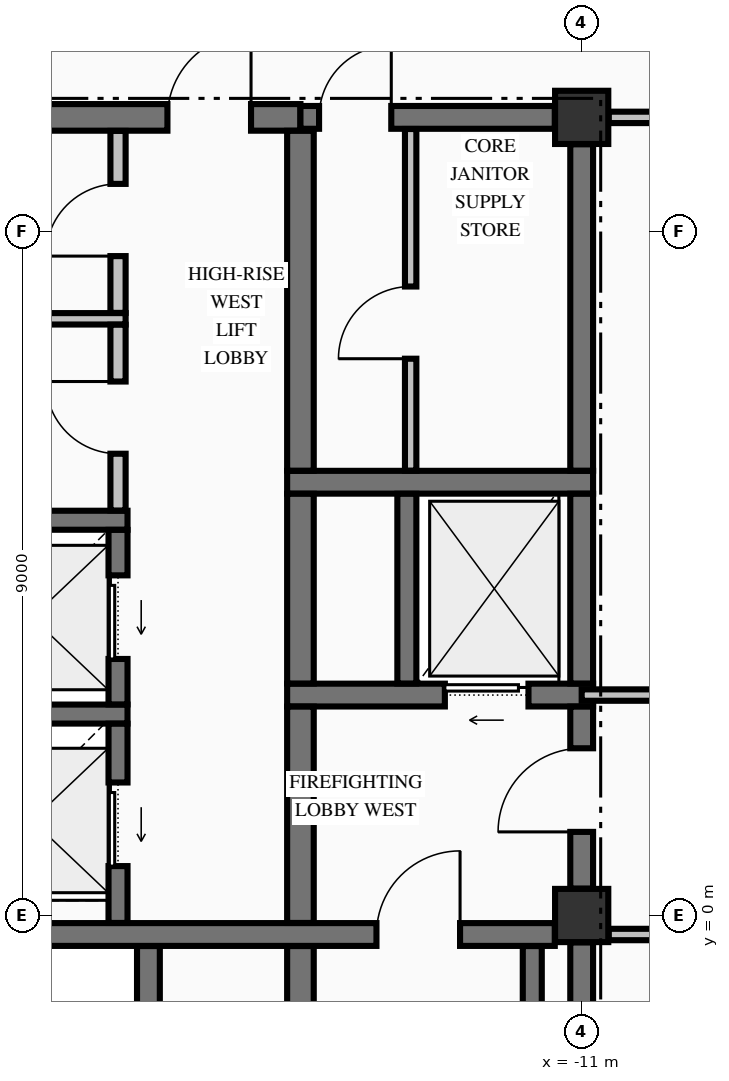
"""IFC4 building model, lengths in metres.
Left out: names, types, materials, properties, quantities, classifications, styles, units other than length and angle.
Written with IfcOpenShell. Run it as: python <this file> out.ifc"""

import sys

from ifc_helpers import new_model, si_unit, direction, frame, frame_2d, origin, origin_2d, place, context, subcontext, project, spatial, rectangle, extrude, element, fill, save


model = new_model("IFC4")
c1 = context("Model", 3, precision=1e-05, world=origin(), true_north=direction((0.0, 1.0)))
c2 = subcontext(c1, "Body", "Model", "MODEL_VIEW")
j1 = project(units=[si_unit("LENGTHUNIT", "METRE"), si_unit("PLANEANGLEUNIT", "RADIAN")], contexts=[c1])
p1 = place(None, origin())
s1 = spatial("IfcSite", under=j1, at=p1, CompositionType="ELEMENT")
p2 = place(p1, origin())
s2 = spatial("IfcBuilding", under=s1, at=p2, CompositionType="ELEMENT")
p3 = place(p2, frame((0.0, 0.0, 254.43)))
s3 = spatial("IfcBuildingStorey", under=s2, at=p3, CompositionType="ELEMENT", Elevation=254.43)
for number, where, z_axis, x_axis in (
    (1, (-11.0, 0.0, -0.425), (0.0, 0.0, 1.0), (1.0, 0.0, 0.0)),
    (2, (-11.0, 10.5, -0.425), (0.0, 0.0, 1.0), (1.0, 0.0, 0.0)),
):
    element("IfcColumn", number, at=place(p3, frame(where, z_axis=z_axis, x_axis=x_axis)), inside=s3, PredefinedType="COLUMN", context=c2, shape_type="SweptSolid", body=[
        extrude(rectangle(XDim=0.7, YDim=0.7, at=origin_2d()), origin(), (0.0, 0.0, 1.0), 3.405),
    ])
p4 = place(p3, frame((-19.646, -0.25, 0.0), z_axis=(0.0, 0.0, 1.0), x_axis=(1.0, 0.0, 0.0)))
e3 = element("IfcWall", 3, at=p4, inside=s3, PredefinedType="SHEAR", context=c2, shape_type="SweptSolid", body=[
    extrude(rectangle(XDim=8.292, YDim=0.3, at=frame_2d((4.146, 0.0))), origin(), (0.0, 0.0, 1.0), 2.98),
])
p5 = place(p4, frame((5.946, 0.0, 0.0)))
e4 = element("IfcOpeningElement", 4, at=p5, cuts=e3, PredefinedType="OPENING", context=c2, shape_type="SweptSolid", body=[
    extrude(rectangle(XDim=1.1, YDim=2.15, at=frame_2d((0.55, 1.075))), frame((0.0, 0.16, 0.0), z_axis=(0.0, -1.0, 0.0), x_axis=(1.0, 0.0, 0.0)), (0.0, 0.0, 1.0), 0.32),
])
p6 = place(p3, frame((-20.175, 2.65, 0.0), z_axis=(0.0, 0.0, 1.0), x_axis=(1.0, 0.0, 0.0)))
e5 = element("IfcWall", 5, at=p6, inside=s3, PredefinedType="SOLIDWALL", context=c2, shape_type="SweptSolid", body=[
    extrude(rectangle(XDim=3.2, YDim=0.25, at=frame_2d((1.6, 0.0))), origin(), (0.0, 0.0, 1.0), 2.98),
])
p7 = place(p3, frame((-14.875, 2.9, 0.0), z_axis=(0.0, 0.0, 1.0), x_axis=(1.0, 0.0, 0.0)))
e6 = element("IfcWall", 6, at=p7, inside=s3, PredefinedType="SHEAR", context=c2, shape_type="SweptSolid", body=[
    extrude(rectangle(XDim=4.025, YDim=0.3, at=frame_2d((2.012, 0.0))), origin(), (0.0, 0.0, 1.0), 2.98),
])
p8 = place(p7, frame((2.075, 0.0, 0.0)))
e7 = element("IfcOpeningElement", 7, at=p8, cuts=e6, PredefinedType="OPENING", context=c2, shape_type="SweptSolid", body=[
    extrude(rectangle(XDim=1.1, YDim=2.2, at=frame_2d((0.55, 1.1))), frame((0.0, 0.16, 0.0), z_axis=(0.0, -1.0, 0.0), x_axis=(1.0, 0.0, 0.0)), (0.0, 0.0, 1.0), 0.32),
])
p9 = place(p3, frame((-20.175, 5.2, 0.0), z_axis=(0.0, 0.0, 1.0), x_axis=(1.0, 0.0, 0.0)))
e8 = element("IfcWall", 8, at=p9, inside=s3, PredefinedType="SOLIDWALL", context=c2, shape_type="SweptSolid", body=[
    extrude(rectangle(XDim=3.2, YDim=0.25, at=frame_2d((1.6, 0.0))), origin(), (0.0, 0.0, 1.0), 2.98),
])
p10 = place(p3, frame((-14.875, 5.7, 0.0), z_axis=(0.0, 0.0, 1.0), x_axis=(1.0, 0.0, 0.0)))
e9 = element("IfcWall", 9, at=p10, inside=s3, PredefinedType="SHEAR", context=c2, shape_type="SweptSolid", body=[
    extrude(rectangle(XDim=4.025, YDim=0.3, at=frame_2d((2.012, 0.0))), origin(), (0.0, 0.0, 1.0), 2.98),
])
p11 = place(p3, frame((-19.646, 10.5, 0.0), z_axis=(0.0, 0.0, 1.0), x_axis=(1.0, 0.0, 0.0)))
e10 = element("IfcWall", 10, at=p11, inside=s3, PredefinedType="SHEAR", context=c2, shape_type="SweptSolid", body=[
    extrude(rectangle(XDim=4.946, YDim=0.35, at=frame_2d((2.473, 0.0))), origin(), (0.0, 0.0, 1.0), 2.98),
])
p12 = place(p11, frame((3.196, 0.0, 0.0)))
e11 = element("IfcOpeningElement", 11, at=p12, cuts=e10, PredefinedType="OPENING", context=c2, shape_type="SweptSolid", body=[
    extrude(rectangle(XDim=1.1, YDim=2.15, at=frame_2d((0.55, 1.075))), frame((0.0, 0.185, 0.0), z_axis=(0.0, -1.0, 0.0), x_axis=(1.0, 0.0, 0.0)), (0.0, 0.0, 1.0), 0.37),
])
p13 = place(p3, frame((-14.7, 10.5, 0.0), z_axis=(0.0, 0.0, 1.0), x_axis=(1.0, 0.0, 0.0)))
e12 = element("IfcWall", 12, at=p13, inside=s3, PredefinedType="SHEAR", context=c2, shape_type="SweptSolid", body=[
    extrude(rectangle(XDim=3.346, YDim=0.3, at=frame_2d((1.673, 0.0))), origin(), (0.0, 0.0, 1.0), 2.98),
])
p14 = place(p13, frame((0.245, 0.0, 0.0)))
e13 = element("IfcOpeningElement", 13, at=p14, cuts=e12, PredefinedType="OPENING", context=c2, shape_type="SweptSolid", body=[
    extrude(rectangle(XDim=0.95, YDim=2.15, at=frame_2d((0.475, 1.075))), frame((0.0, 0.16, 0.0), z_axis=(0.0, -1.0, 0.0), x_axis=(1.0, 0.0, 0.0)), (0.0, 0.0, 1.0), 0.32),
])
p15 = place(p3, frame((-10.644, -0.25, 0.0), z_axis=(0.0, 0.0, 1.0), x_axis=(1.0, 0.0, 0.0)))
e14 = element("IfcWall", 14, at=p15, inside=s3, PredefinedType="PARTITIONING", context=c2, shape_type="SweptSolid", body=[
    extrude(rectangle(XDim=21.288, YDim=0.15, at=frame_2d((10.644, 0.0))), origin(), (0.0, 0.0, 1.0), 2.98),
])
p16 = place(p15, frame((7.344, 0.0, 0.0)))
e15 = element("IfcOpeningElement", 15, at=p16, cuts=e14, PredefinedType="OPENING", context=c2, shape_type="SweptSolid", body=[
    extrude(rectangle(XDim=1.1, YDim=2.15, at=frame_2d((0.55, 1.075))), frame((0.0, 0.085, 0.0), z_axis=(0.0, -1.0, 0.0), x_axis=(1.0, 0.0, 0.0)), (0.0, 0.0, 1.0), 0.17),
])
p17 = place(p15, frame((2.699, 0.0, 0.0)))
e16 = element("IfcOpeningElement", 16, at=p17, cuts=e14, PredefinedType="OPENING", context=c2, shape_type="SweptSolid", body=[
    extrude(rectangle(XDim=1.05, YDim=2.15, at=frame_2d((0.525, 1.075))), frame((0.0, 0.085, 0.0), z_axis=(0.0, -1.0, 0.0), x_axis=(1.0, 0.0, 0.0)), (0.0, 0.0, 1.0), 0.17),
])
p18 = place(p15, frame((14.839, 0.0, 0.0)))
e17 = element("IfcOpeningElement", 17, at=p18, cuts=e14, PredefinedType="OPENING", context=c2, shape_type="SweptSolid", body=[
    extrude(rectangle(XDim=0.95, YDim=2.15, at=frame_2d((0.475, 1.075))), frame((0.0, 0.085, 0.0), z_axis=(0.0, -1.0, 0.0), x_axis=(1.0, 0.0, 0.0)), (0.0, 0.0, 1.0), 0.17),
])
p19 = place(p3, frame((-11.0, 2.9, 0.0), z_axis=(0.0, 0.0, 1.0), x_axis=(1.0, 0.0, 0.0)))
e18 = element("IfcWall", 18, at=p19, inside=s3, PredefinedType="PARTITIONING", context=c2, shape_type="SweptSolid", body=[
    extrude(rectangle(XDim=22.0, YDim=0.15, at=frame_2d((11.0, 0.0))), origin(), (0.0, 0.0, 1.0), 2.98),
])
p20 = place(p19, frame((7.7, 0.0, 0.0)))
e19 = element("IfcOpeningElement", 19, at=p20, cuts=e18, PredefinedType="OPENING", context=c2, shape_type="SweptSolid", body=[
    extrude(rectangle(XDim=1.1, YDim=2.15, at=frame_2d((0.55, 1.075))), frame((0.0, 0.085, 0.0), z_axis=(0.0, -1.0, 0.0), x_axis=(1.0, 0.0, 0.0)), (0.0, 0.0, 1.0), 0.17),
])
p21 = place(p19, frame((3.055, 0.0, 0.0)))
e20 = element("IfcOpeningElement", 20, at=p21, cuts=e18, PredefinedType="OPENING", context=c2, shape_type="SweptSolid", body=[
    extrude(rectangle(XDim=1.05, YDim=2.15, at=frame_2d((0.525, 1.075))), frame((0.0, 0.085, 0.0), z_axis=(0.0, -1.0, 0.0), x_axis=(1.0, 0.0, 0.0)), (0.0, 0.0, 1.0), 0.17),
])
p22 = place(p19, frame((11.475, 0.0, 0.0)))
e21 = element("IfcOpeningElement", 21, at=p22, cuts=e18, PredefinedType="OPENING", context=c2, shape_type="SweptSolid", body=[
    extrude(rectangle(XDim=0.95, YDim=2.15, at=frame_2d((0.475, 1.075))), frame((0.0, 0.085, 0.0), z_axis=(0.0, -1.0, 0.0), x_axis=(1.0, 0.0, 0.0)), (0.0, 0.0, 1.0), 0.17),
])
p23 = place(p19, frame((17.795, 0.0, 0.0)))
e22 = element("IfcOpeningElement", 22, at=p23, cuts=e18, PredefinedType="OPENING", context=c2, shape_type="SweptSolid", body=[
    extrude(rectangle(XDim=0.95, YDim=2.15, at=frame_2d((0.475, 1.075))), frame((0.0, 0.085, 0.0), z_axis=(0.0, -1.0, 0.0), x_axis=(1.0, 0.0, 0.0)), (0.0, 0.0, 1.0), 0.17),
])
p24 = place(p3, frame((-19.822, 7.85, 0.0), z_axis=(0.0, 0.0, 1.0), x_axis=(1.0, 0.0, 0.0)))
e23 = element("IfcWall", 23, at=p24, inside=s3, PredefinedType="PARTITIONING", context=c2, shape_type="SweptSolid", body=[
    extrude(rectangle(XDim=2.822, YDim=0.15, at=frame_2d((1.411, 0.0))), origin(), (0.0, 0.0, 1.0), 2.98),
])
p25 = place(p3, frame((-10.644, 10.5, 0.0), z_axis=(0.0, 0.0, 1.0), x_axis=(1.0, 0.0, 0.0)))
e24 = element("IfcWall", 24, at=p25, inside=s3, PredefinedType="PARTITIONING", context=c2, shape_type="SweptSolid", body=[
    extrude(rectangle(XDim=21.288, YDim=0.15, at=frame_2d((10.644, 0.0))), origin(), (0.0, 0.0, 1.0), 2.98),
])
p26 = place(p25, frame((7.344, 0.0, 0.0)))
e25 = element("IfcOpeningElement", 25, at=p26, cuts=e24, PredefinedType="OPENING", context=c2, shape_type="SweptSolid", body=[
    extrude(rectangle(XDim=1.1, YDim=2.15, at=frame_2d((0.55, 1.075))), frame((0.0, 0.085, 0.0), z_axis=(0.0, -1.0, 0.0), x_axis=(1.0, 0.0, 0.0)), (0.0, 0.0, 1.0), 0.17),
])
p27 = place(p3, frame((-17.1, -0.098, 0.0), z_axis=(0.0, 0.0, 1.0), x_axis=(0.0, 1.0, 0.0)))
e26 = element("IfcWall", 26, at=p27, inside=s3, PredefinedType="SOLIDWALL", context=c2, shape_type="SweptSolid", body=[
    extrude(rectangle(XDim=2.621, YDim=0.25, at=frame_2d((1.311, 0.0))), origin(), (0.0, 0.0, 1.0), 2.98),
])
p28 = place(p27, frame((0.748, 0.0, 0.0)))
e27 = element("IfcOpeningElement", 27, at=p28, cuts=e26, PredefinedType="OPENING", context=c2, shape_type="SweptSolid", body=[
    extrude(rectangle(XDim=1.1, YDim=2.2, at=frame_2d((0.55, 1.1))), frame((0.0, 0.135, 0.0), z_axis=(0.0, -1.0, 0.0), x_axis=(1.0, 0.0, 0.0)), (0.0, 0.0, 1.0), 0.27),
])
p29 = place(p3, frame((-17.1, 2.777, 0.0), z_axis=(0.0, 0.0, 1.0), x_axis=(0.0, 1.0, 0.0)))
e28 = element("IfcWall", 28, at=p29, inside=s3, PredefinedType="SOLIDWALL", context=c2, shape_type="SweptSolid", body=[
    extrude(rectangle(XDim=2.296, YDim=0.25, at=frame_2d((1.148, 0.0))), origin(), (0.0, 0.0, 1.0), 2.98),
])
p30 = place(p29, frame((0.598, 0.0, 0.0)))
e29 = element("IfcOpeningElement", 29, at=p30, cuts=e28, PredefinedType="OPENING", context=c2, shape_type="SweptSolid", body=[
    extrude(rectangle(XDim=1.1, YDim=2.2, at=frame_2d((0.55, 1.1))), frame((0.0, 0.135, 0.0), z_axis=(0.0, -1.0, 0.0), x_axis=(1.0, 0.0, 0.0)), (0.0, 0.0, 1.0), 0.27),
])
p31 = place(p3, frame((-16.7, -9.773, 0.0), z_axis=(0.0, 0.0, 1.0), x_axis=(0.0, 1.0, 0.0)))
e30 = element("IfcWall", 30, at=p31, inside=s3, PredefinedType="SHEAR", context=c2, shape_type="SweptSolid", body=[
    extrude(rectangle(XDim=9.371, YDim=0.3, at=frame_2d((4.686, 0.0))), origin(), (0.0, 0.0, 1.0), 2.98),
])
p32 = place(p3, frame((-14.7, -9.773, 0.0), z_axis=(0.0, 0.0, 1.0), x_axis=(0.0, 1.0, 0.0)))
e31 = element("IfcWall", 31, at=p32, inside=s3, PredefinedType="SHEAR", context=c2, shape_type="SweptSolid", body=[
    extrude(rectangle(XDim=9.371, YDim=0.35, at=frame_2d((4.686, 0.0))), origin(), (0.0, 0.0, 1.0), 2.98),
])
p33 = place(p3, frame((-14.7, -0.098, 0.0), z_axis=(0.0, 0.0, 1.0), x_axis=(0.0, 1.0, 0.0)))
e32 = element("IfcWall", 32, at=p33, inside=s3, PredefinedType="SHEAR", context=c2, shape_type="SweptSolid", body=[
    extrude(rectangle(XDim=2.846, YDim=0.35, at=frame_2d((1.423, 0.0))), origin(), (0.0, 0.0, 1.0), 2.98),
])
p34 = place(p3, frame((-14.7, 3.052, 0.0), z_axis=(0.0, 0.0, 1.0), x_axis=(0.0, 1.0, 0.0)))
e33 = element("IfcWall", 33, at=p34, inside=s3, PredefinedType="SHEAR", context=c2, shape_type="SweptSolid", body=[
    extrude(rectangle(XDim=2.496, YDim=0.35, at=frame_2d((1.248, 0.0))), origin(), (0.0, 0.0, 1.0), 2.98),
])
p35 = place(p3, frame((-14.7, 5.852, 0.0), z_axis=(0.0, 0.0, 1.0), x_axis=(0.0, 1.0, 0.0)))
e34 = element("IfcWall", 34, at=p35, inside=s3, PredefinedType="SHEAR", context=c2, shape_type="SweptSolid", body=[
    extrude(rectangle(XDim=4.471, YDim=0.35, at=frame_2d((2.235, 0.0))), origin(), (0.0, 0.0, 1.0), 2.98),
])
p36 = place(p3, frame((-13.3, 3.052, 0.0), z_axis=(0.0, 0.0, 1.0), x_axis=(0.0, 1.0, 0.0)))
e35 = element("IfcWall", 35, at=p36, inside=s3, PredefinedType="SOLIDWALL", context=c2, shape_type="SweptSolid", body=[
    extrude(rectangle(XDim=2.496, YDim=0.25, at=frame_2d((1.248, 0.0))), origin(), (0.0, 0.0, 1.0), 2.98),
])
p37 = place(p3, frame((-11.65, -9.798, 0.0), z_axis=(0.0, 0.0, 1.0), x_axis=(0.0, 1.0, 0.0)))
e36 = element("IfcWall", 36, at=p37, inside=s3, PredefinedType="SOLIDWALL", context=c2, shape_type="SweptSolid", body=[
    extrude(rectangle(XDim=9.396, YDim=0.25, at=frame_2d((4.698, 0.0))), origin(), (0.0, 0.0, 1.0), 2.98),
])
p38 = place(p3, frame((-11.0, -9.596, 0.0), z_axis=(0.0, 0.0, 1.0), x_axis=(0.0, 1.0, 0.0)))
e37 = element("IfcWall", 37, at=p38, inside=s3, PredefinedType="SHEAR", context=c2, shape_type="SweptSolid", body=[
    extrude(rectangle(XDim=9.242, YDim=0.3, at=frame_2d((4.621, 0.0))), origin(), (0.0, 0.0, 1.0), 2.98),
])
p39 = place(p3, frame((-11.0, 0.354, 0.0), z_axis=(0.0, 0.0, 1.0), x_axis=(0.0, 1.0, 0.0)))
e38 = element("IfcWall", 38, at=p39, inside=s3, PredefinedType="SHEAR", context=c2, shape_type="SweptSolid", body=[
    extrude(rectangle(XDim=2.394, YDim=0.3, at=frame_2d((1.197, 0.0))), origin(), (0.0, 0.0, 1.0), 2.98),
])
p40 = place(p39, frame((0.746, 0.0, 0.0)))
e39 = element("IfcOpeningElement", 39, at=p40, cuts=e38, PredefinedType="OPENING", context=c2, shape_type="SweptSolid", body=[
    extrude(rectangle(XDim=1.1, YDim=2.15, at=frame_2d((0.55, 1.075))), frame((0.0, 0.16, 0.0), z_axis=(0.0, -1.0, 0.0), x_axis=(1.0, 0.0, 0.0)), (0.0, 0.0, 1.0), 0.32),
])
p41 = place(p3, frame((-11.0, 3.052, 0.0), z_axis=(0.0, 0.0, 1.0), x_axis=(0.0, 1.0, 0.0)))
e40 = element("IfcWall", 40, at=p41, inside=s3, PredefinedType="SHEAR", context=c2, shape_type="SweptSolid", body=[
    extrude(rectangle(XDim=2.496, YDim=0.3, at=frame_2d((1.248, 0.0))), origin(), (0.0, 0.0, 1.0), 2.98),
])
p42 = place(p3, frame((-11.0, 5.852, 0.0), z_axis=(0.0, 0.0, 1.0), x_axis=(0.0, 1.0, 0.0)))
e41 = element("IfcWall", 41, at=p42, inside=s3, PredefinedType="SHEAR", context=c2, shape_type="SweptSolid", body=[
    extrude(rectangle(XDim=4.294, YDim=0.3, at=frame_2d((2.147, 0.0))), origin(), (0.0, 0.0, 1.0), 2.98),
])
p43 = place(p3, frame((-17.1, 5.328, 0.0), z_axis=(0.0, 0.0, 1.0), x_axis=(0.0, 1.0, 0.0)))
e42 = element("IfcWall", 42, at=p43, inside=s3, PredefinedType="PARTITIONING", context=c2, shape_type="SweptSolid", body=[
    extrude(rectangle(XDim=2.444, YDim=0.2, at=frame_2d((1.222, 0.0))), origin(), (0.0, 0.0, 1.0), 2.98),
])
p44 = place(p43, frame((0.747, 0.0, 0.0)))
e43 = element("IfcOpeningElement", 43, at=p44, cuts=e42, PredefinedType="OPENING", context=c2, shape_type="SweptSolid", body=[
    extrude(rectangle(XDim=0.95, YDim=2.15, at=frame_2d((0.475, 1.075))), frame((0.0, 0.11, 0.0), z_axis=(0.0, -1.0, 0.0), x_axis=(1.0, 0.0, 0.0)), (0.0, 0.0, 1.0), 0.22),
])
p45 = place(p3, frame((-17.1, 7.928, 0.0), z_axis=(0.0, 0.0, 1.0), x_axis=(0.0, 1.0, 0.0)))
e44 = element("IfcWall", 44, at=p45, inside=s3, PredefinedType="PARTITIONING", context=c2, shape_type="SweptSolid", body=[
    extrude(rectangle(XDim=2.394, YDim=0.2, at=frame_2d((1.197, 0.0))), origin(), (0.0, 0.0, 1.0), 2.98),
])
p46 = place(p45, frame((0.747, 0.0, 0.0)))
e45 = element("IfcOpeningElement", 45, at=p46, cuts=e44, PredefinedType="OPENING", context=c2, shape_type="SweptSolid", body=[
    extrude(rectangle(XDim=0.95, YDim=2.15, at=frame_2d((0.475, 1.075))), frame((0.0, 0.11, 0.0), z_axis=(0.0, -1.0, 0.0), x_axis=(1.0, 0.0, 0.0)), (0.0, 0.0, 1.0), 0.22),
])
p47 = place(p3, frame((-13.25, 5.853, 0.0), z_axis=(0.0, 0.0, 1.0), x_axis=(0.0, 1.0, 0.0)))
e46 = element("IfcWall", 46, at=p47, inside=s3, PredefinedType="PARTITIONING", context=c2, shape_type="SweptSolid", body=[
    extrude(rectangle(XDim=4.494, YDim=0.15, at=frame_2d((2.247, 0.0))), origin(), (0.0, 0.0, 1.0), 2.98),
])
p48 = place(p47, frame((1.472, 0.0, 0.0)))
e47 = element("IfcOpeningElement", 47, at=p48, cuts=e46, PredefinedType="OPENING", context=c2, shape_type="SweptSolid", body=[
    extrude(rectangle(XDim=0.95, YDim=2.15, at=frame_2d((0.475, 1.075))), frame((0.0, 0.085, 0.0), z_axis=(0.0, -1.0, 0.0), x_axis=(1.0, 0.0, 0.0)), (0.0, 0.0, 1.0), 0.17),
])
p49 = place(p5, origin())
e48 = element("IfcDoor", 48, at=p49, inside=s3, OperationType="SINGLE_SWING_RIGHT", PredefinedType="DOOR", context=c2, shape_type="SweptSolid", body=[
    extrude(rectangle(XDim=1.1, YDim=2.15, at=frame_2d((0.55, 1.075))), frame((0.0, 0.025, 0.0), z_axis=(0.0, -1.0, 0.0), x_axis=(1.0, 0.0, 0.0)), (0.0, 0.0, 1.0), 0.05),
])
fill(e4, e48)
p50 = place(p40, origin())
e49 = element("IfcDoor", 49, at=p50, inside=s3, OperationType="SINGLE_SWING_LEFT", PredefinedType="DOOR", context=c2, shape_type="SweptSolid", body=[
    extrude(rectangle(XDim=1.1, YDim=2.15, at=frame_2d((0.55, 1.075))), frame((0.0, 0.025, 0.0), z_axis=(0.0, -1.0, 0.0), x_axis=(1.0, 0.0, 0.0)), (0.0, 0.0, 1.0), 0.05),
])
fill(e39, e49)
p51 = place(p8, origin())
e50 = element("IfcDoor", 50, at=p51, inside=s3, OperationType="SLIDING_TO_LEFT", PredefinedType="DOOR", context=c2, shape_type="SweptSolid", body=[
    extrude(rectangle(XDim=1.1, YDim=2.2, at=frame_2d((0.55, 1.1))), frame((0.0, 0.025, 0.0), z_axis=(0.0, -1.0, 0.0), x_axis=(1.0, 0.0, 0.0)), (0.0, 0.0, 1.0), 0.05),
])
fill(e7, e50)
p52 = place(p14, origin())
e51 = element("IfcDoor", 51, at=p52, inside=s3, OperationType="SINGLE_SWING_RIGHT", PredefinedType="DOOR", context=c2, shape_type="SweptSolid", body=[
    extrude(rectangle(XDim=0.95, YDim=2.15, at=frame_2d((0.475, 1.075))), frame((0.0, 0.025, 0.0), z_axis=(0.0, -1.0, 0.0), x_axis=(1.0, 0.0, 0.0)), (0.0, 0.0, 1.0), 0.05),
])
fill(e13, e51)
p53 = place(p48, origin())
e52 = element("IfcDoor", 52, at=p53, inside=s3, OperationType="SINGLE_SWING_LEFT", PredefinedType="DOOR", context=c2, shape_type="SweptSolid", body=[
    extrude(rectangle(XDim=0.95, YDim=2.15, at=frame_2d((0.475, 1.075))), frame((0.0, 0.025, 0.0), z_axis=(0.0, -1.0, 0.0), x_axis=(1.0, 0.0, 0.0)), (0.0, 0.0, 1.0), 0.05),
])
fill(e47, e52)
p54 = place(p28, origin())
e53 = element("IfcDoor", 53, at=p54, inside=s3, OperationType="SLIDING_TO_LEFT", PredefinedType="DOOR", context=c2, shape_type="SweptSolid", body=[
    extrude(rectangle(XDim=1.1, YDim=2.2, at=frame_2d((0.55, 1.1))), frame((0.0, 0.025, 0.0), z_axis=(0.0, -1.0, 0.0), x_axis=(1.0, 0.0, 0.0)), (0.0, 0.0, 1.0), 0.05),
])
fill(e27, e53)
p55 = place(p30, origin())
e54 = element("IfcDoor", 54, at=p55, inside=s3, OperationType="SLIDING_TO_LEFT", PredefinedType="DOOR", context=c2, shape_type="SweptSolid", body=[
    extrude(rectangle(XDim=1.1, YDim=2.2, at=frame_2d((0.55, 1.1))), frame((0.0, 0.025, 0.0), z_axis=(0.0, -1.0, 0.0), x_axis=(1.0, 0.0, 0.0)), (0.0, 0.0, 1.0), 0.05),
])
fill(e29, e54)
p56 = place(p12, origin())
e55 = element("IfcDoor", 55, at=p56, inside=s3, OperationType="SINGLE_SWING_RIGHT", PredefinedType="DOOR", context=c2, shape_type="SweptSolid", body=[
    extrude(rectangle(XDim=1.1, YDim=2.15, at=frame_2d((0.55, 1.075))), frame((0.0, 0.025, 0.0), z_axis=(0.0, -1.0, 0.0), x_axis=(1.0, 0.0, 0.0)), (0.0, 0.0, 1.0), 0.05),
])
fill(e11, e55)
p57 = place(p46, origin())
e56 = element("IfcDoor", 56, at=p57, inside=s3, OperationType="SINGLE_SWING_LEFT", PredefinedType="DOOR", context=c2, shape_type="SweptSolid", body=[
    extrude(rectangle(XDim=0.95, YDim=2.15, at=frame_2d((0.475, 1.075))), frame((0.0, 0.025, 0.0), z_axis=(0.0, -1.0, 0.0), x_axis=(1.0, 0.0, 0.0)), (0.0, 0.0, 1.0), 0.05),
])
fill(e45, e56)
p58 = place(p44, origin())
e57 = element("IfcDoor", 57, at=p58, inside=s3, OperationType="SINGLE_SWING_RIGHT", PredefinedType="DOOR", context=c2, shape_type="SweptSolid", body=[
    extrude(rectangle(XDim=0.95, YDim=2.15, at=frame_2d((0.475, 1.075))), frame((0.0, 0.025, 0.0), z_axis=(0.0, -1.0, 0.0), x_axis=(1.0, 0.0, 0.0)), (0.0, 0.0, 1.0), 0.05),
])
fill(e43, e57)
save(model, sys.argv[1])
